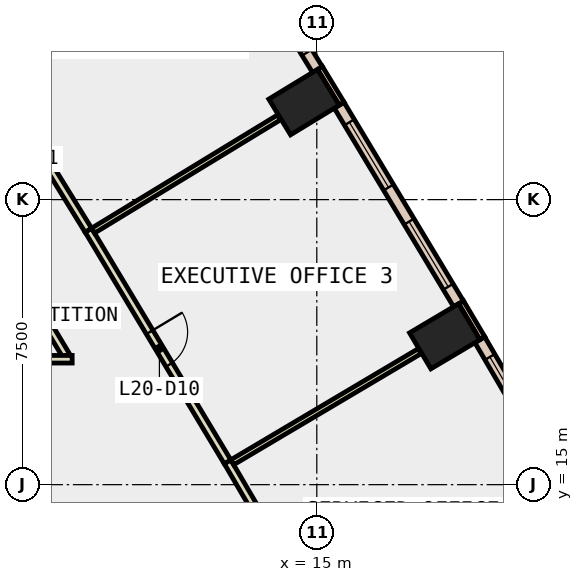
"""IFC4 building model, lengths in metres.
Left out: names, types, materials, properties, quantities, classifications, styles, units other than length and angle.
Written with IfcOpenShell. Run it as: python <this file> out.ifc"""

import sys

from ifc_helpers import new_model, si_unit, direction, frame, frame_2d, origin, origin_2d, place, context, subcontext, project, spatial, rectangle, extrude, element, fill, save


model = new_model("IFC4")
c1 = context("Model", 3, precision=1e-05, world=origin(), true_north=direction((0.0, 1.0)))
c2 = subcontext(c1, "Body", "Model", "MODEL_VIEW")
j1 = project(units=[si_unit("LENGTHUNIT", "METRE"), si_unit("PLANEANGLEUNIT", "RADIAN")], contexts=[c1])
p1 = place(None, origin())
s1 = spatial("IfcSite", under=j1, at=p1, CompositionType="ELEMENT")
p2 = place(p1, origin())
s2 = spatial("IfcBuilding", under=s1, at=p2, CompositionType="ELEMENT")
p3 = place(p2, frame((0.0, 0.0, 95.0)))
s3 = spatial("IfcBuildingStorey", under=s2, at=p3, CompositionType="ELEMENT", Elevation=95.0)
for number, where, z_axis, x_axis in (
    (1, (18.367, 18.904, -0.4), (0.0, 0.0, 1.0), (-0.51, 0.86, 0.0)),
    (2, (14.664, 25.065, -0.4), (0.0, 0.0, 1.0), (-0.52, 0.854, 0.0)),
):
    element("IfcColumn", number, at=place(p3, frame(where, z_axis=z_axis, x_axis=x_axis)), inside=s3, PredefinedType="COLUMN", context=c2, shape_type="SweptSolid", body=[
        extrude(rectangle(XDim=1.1, YDim=1.5, at=origin_2d()), origin(), (0.0, 0.0, 1.0), 4.2),
    ])
p4 = place(p3, frame((19.357, 18.852, 0.0), z_axis=(0.0, 0.0, 1.0), x_axis=(-0.510082245696, 0.860125631885, 0.0)))
e3 = element("IfcWall", 3, at=p4, inside=s3, PredefinedType="STANDARD", context=c2, shape_type="SweptSolid", body=[
    extrude(rectangle(XDim=1.1, YDim=0.15, at=frame_2d((0.55, 0.0))), origin(), (0.0, 0.0, 1.0), 3.8),
])
p5 = place(p3, frame((15.655, 25.024, 0.0), z_axis=(0.0, 0.0, 1.0), x_axis=(-0.51977099384, 0.854305632641, 0.0)))
e4 = element("IfcWall", 4, at=p5, inside=s3, PredefinedType="STANDARD", context=c2, shape_type="SweptSolid", body=[
    extrude(rectangle(XDim=1.101, YDim=0.15, at=frame_2d((0.55, 0.0))), origin(), (0.0, 0.0, 1.0), 3.8),
])
p6 = place(p3, frame((22.369, 13.549, 0.0), z_axis=(0.0, 0.0, 1.0), x_axis=(-0.504998117261, 0.863120444413, 0.0)))
e5 = element("IfcWall", 5, at=p6, inside=s3, PredefinedType="STANDARD", context=c2, shape_type="SweptSolid", body=[
    extrude(rectangle(XDim=6.099, YDim=0.3, at=frame_2d((3.049, 0.0))), origin(), (0.0, 0.0, 1.0), 3.8),
])
p7 = place(p6, frame((0.525, 0.0, 0.9)))
e6 = element("IfcOpeningElement", 6, at=p7, cuts=e5, PredefinedType="OPENING", context=c2, shape_type="SweptSolid", body=[
    extrude(rectangle(XDim=2.0, YDim=2.6, at=frame_2d((1.0, 1.3))), frame((0.0, 0.16, 0.0), z_axis=(0.0, -1.0, 0.0), x_axis=(1.0, 0.0, 0.0)), (0.0, 0.0, 1.0), 0.32),
])
p8 = place(p6, frame((3.574, 0.0, 0.9)))
e7 = element("IfcOpeningElement", 7, at=p8, cuts=e5, PredefinedType="OPENING", context=c2, shape_type="SweptSolid", body=[
    extrude(rectangle(XDim=2.0, YDim=2.6, at=frame_2d((1.0, 1.3))), frame((0.0, 0.16, 0.0), z_axis=(0.0, -1.0, 0.0), x_axis=(1.0, 0.0, 0.0)), (0.0, 0.0, 1.0), 0.32),
])
p9 = place(p3, frame((18.729, 19.757, 0.0), z_axis=(0.0, 0.0, 1.0), x_axis=(-0.515102053092, 0.857128855483, 0.0)))
e8 = element("IfcWall", 8, at=p9, inside=s3, PredefinedType="STANDARD", context=c2, shape_type="SweptSolid", body=[
    extrude(rectangle(XDim=6.098, YDim=0.3, at=frame_2d((3.049, 0.0))), origin(), (0.0, 0.0, 1.0), 3.8),
])
p10 = place(p9, frame((0.525, 0.0, 0.9)))
e9 = element("IfcOpeningElement", 9, at=p10, cuts=e8, PredefinedType="OPENING", context=c2, shape_type="SweptSolid", body=[
    extrude(rectangle(XDim=2.0, YDim=2.6, at=frame_2d((1.0, 1.3))), frame((0.0, 0.16, 0.0), z_axis=(0.0, -1.0, 0.0), x_axis=(1.0, 0.0, 0.0)), (0.0, 0.0, 1.0), 0.32),
])
p11 = place(p9, frame((3.574, 0.0, 0.9)))
e10 = element("IfcOpeningElement", 10, at=p11, cuts=e8, PredefinedType="OPENING", context=c2, shape_type="SweptSolid", body=[
    extrude(rectangle(XDim=2.0, YDim=2.6, at=frame_2d((1.0, 1.3))), frame((0.0, 0.16, 0.0), z_axis=(0.0, -1.0, 0.0), x_axis=(1.0, 0.0, 0.0)), (0.0, 0.0, 1.0), 0.32),
])
p12 = place(p3, frame((15.017, 25.922, 0.0), z_axis=(0.0, 0.0, 1.0), x_axis=(-0.525204788886, 0.850975869065, 0.0)))
e11 = element("IfcWall", 11, at=p12, inside=s3, PredefinedType="STANDARD", context=c2, shape_type="SweptSolid", body=[
    extrude(rectangle(XDim=6.099, YDim=0.3, at=frame_2d((3.049, 0.0))), origin(), (0.0, 0.0, 1.0), 3.8),
])
p13 = place(p12, frame((0.525, 0.0, 0.9)))
e12 = element("IfcOpeningElement", 12, at=p13, cuts=e11, PredefinedType="OPENING", context=c2, shape_type="SweptSolid", body=[
    extrude(rectangle(XDim=2.0, YDim=2.6, at=frame_2d((1.0, 1.3))), frame((0.0, 0.16, 0.0), z_axis=(0.0, -1.0, 0.0), x_axis=(1.0, 0.0, 0.0)), (0.0, 0.0, 1.0), 0.32),
])
p14 = place(p12, frame((3.574, 0.0, 0.9)))
e13 = element("IfcOpeningElement", 13, at=p14, cuts=e11, PredefinedType="OPENING", context=c2, shape_type="SweptSolid", body=[
    extrude(rectangle(XDim=2.0, YDim=2.6, at=frame_2d((1.0, 1.3))), frame((0.0, 0.16, 0.0), z_axis=(0.0, -1.0, 0.0), x_axis=(1.0, 0.0, 0.0)), (0.0, 0.0, 1.0), 0.32),
])
p15 = place(p3, frame((8.411, 18.386, 0.0), z_axis=(0.0, 0.0, 1.0), x_axis=(-0.515008089027, 0.857185317325, 0.0)))
e14 = element("IfcWall", 14, at=p15, inside=s3, PredefinedType="PARTITIONING", context=c2, shape_type="SweptSolid", body=[
    extrude(rectangle(XDim=2.452, YDim=0.2, at=frame_2d((1.226, 0.0))), origin(), (0.0, 0.0, 1.0), 3.8),
])
p16 = place(p3, frame((12.652, 15.602, 0.0), z_axis=(0.0, 0.0, 1.0), x_axis=(0.504914693075, -0.863169249172, 0.0)))
e15 = element("IfcWall", 15, at=p16, inside=s3, PredefinedType="PARTITIONING", context=c2, shape_type="SweptSolid", body=[
    extrude(rectangle(XDim=7.11, YDim=0.2, at=frame_2d((3.555, 0.0))), origin(), (0.0, 0.0, 1.0), 3.8),
])
p17 = place(p16, frame((3.13, 0.0, 0.0)))
e16 = element("IfcOpeningElement", 16, at=p17, cuts=e15, PredefinedType="OPENING", context=c2, shape_type="SweptSolid", body=[
    extrude(rectangle(XDim=1.0, YDim=2.1, at=frame_2d((0.5, 1.05))), frame((0.0, 0.11, 0.0), z_axis=(0.0, -1.0, 0.0), x_axis=(1.0, 0.0, 0.0)), (0.0, 0.0, 1.0), 0.22),
])
p18 = place(p3, frame((8.989, 21.696, 0.0), z_axis=(0.0, 0.0, 1.0), x_axis=(0.515000602442, -0.857189815318, 0.0)))
e17 = element("IfcWall", 17, at=p18, inside=s3, PredefinedType="PARTITIONING", context=c2, shape_type="SweptSolid", body=[
    extrude(rectangle(XDim=7.11, YDim=0.2, at=frame_2d((3.555, 0.0))), origin(), (0.0, 0.0, 1.0), 3.8),
])
p19 = place(p18, frame((3.13, 0.0, 0.0)))
e18 = element("IfcOpeningElement", 18, at=p19, cuts=e17, PredefinedType="OPENING", context=c2, shape_type="SweptSolid", body=[
    extrude(rectangle(XDim=1.0, YDim=2.1, at=frame_2d((0.5, 1.05))), frame((0.0, 0.11, 0.0), z_axis=(0.0, -1.0, 0.0), x_axis=(1.0, 0.0, 0.0)), (0.0, 0.0, 1.0), 0.22),
])
p20 = place(p3, frame((5.254, 27.747, 0.0), z_axis=(0.0, 0.0, 1.0), x_axis=(0.52516023635, -0.851003364363, 0.0)))
e19 = element("IfcWall", 19, at=p20, inside=s3, PredefinedType="PARTITIONING", context=c2, shape_type="SweptSolid", body=[
    extrude(rectangle(XDim=7.11, YDim=0.2, at=frame_2d((3.555, 0.0))), origin(), (0.0, 0.0, 1.0), 3.8),
])
p21 = place(p20, frame((3.13, 0.0, 0.0)))
e20 = element("IfcOpeningElement", 20, at=p21, cuts=e19, PredefinedType="OPENING", context=c2, shape_type="SweptSolid", body=[
    extrude(rectangle(XDim=1.0, YDim=2.1, at=frame_2d((0.5, 1.05))), frame((0.0, 0.11, 0.0), z_axis=(0.0, -1.0, 0.0), x_axis=(1.0, 0.0, 0.0)), (0.0, 0.0, 1.0), 0.22),
])
p22 = place(p3, frame((0.4, 18.3, 0.0), z_axis=(0.0, 0.0, 1.0), x_axis=(1.0, 0.0, 0.0)))
e21 = element("IfcWall", 21, at=p22, inside=s3, PredefinedType="PARTITIONING", context=c2, shape_type="SweptSolid", body=[
    extrude(rectangle(XDim=8.163, YDim=0.2, at=frame_2d((4.082, 0.0))), origin(), (0.0, 0.0, 1.0), 3.8),
])
p23 = place(p22, frame((3.356, 0.0, 0.0)))
e22 = element("IfcOpeningElement", 22, at=p23, cuts=e21, PredefinedType="OPENING", context=c2, shape_type="SweptSolid", body=[
    extrude(rectangle(XDim=1.0, YDim=2.1, at=frame_2d((0.5, 1.05))), frame((0.0, 0.11, 0.0), z_axis=(0.0, -1.0, 0.0), x_axis=(1.0, 0.0, 0.0)), (0.0, 0.0, 1.0), 0.22),
])
p24 = place(p22, frame((4.456, 0.0, 0.0)))
e23 = element("IfcOpeningElement", 23, at=p24, cuts=e21, PredefinedType="OPENING", context=c2, shape_type="SweptSolid", body=[
    extrude(rectangle(XDim=1.0, YDim=2.1, at=frame_2d((0.5, 1.05))), frame((0.0, 0.11, 0.0), z_axis=(0.0, -1.0, 0.0), x_axis=(1.0, 0.0, 0.0)), (0.0, 0.0, 1.0), 0.22),
])
p25 = place(p3, frame((12.776, 15.589, 0.0), z_axis=(0.0, 0.0, 1.0), x_axis=(0.860225086153, 0.509914503768, 0.0)))
e24 = element("IfcWall", 24, at=p25, inside=s3, PredefinedType="PARTITIONING", context=c2, shape_type="SweptSolid", body=[
    extrude(rectangle(XDim=5.73, YDim=0.15, at=frame_2d((2.865, 0.0))), origin(), (0.0, 0.0, 1.0), 3.8),
])
p26 = place(p3, frame((9.113, 21.684, 0.0), z_axis=(0.0, 0.0, 1.0), x_axis=(0.854075097122, 0.520149717367, 0.0)))
e25 = element("IfcWall", 25, at=p26, inside=s3, PredefinedType="PARTITIONING", context=c2, shape_type="SweptSolid", body=[
    extrude(rectangle(XDim=5.729, YDim=0.15, at=frame_2d((2.865, 0.0))), origin(), (0.0, 0.0, 1.0), 3.8),
])
p27 = place(p8, origin())
e26 = element("IfcWindow", 26, at=p27, inside=s3, PartitioningType="SINGLE_PANEL", PredefinedType="WINDOW", context=c2, shape_type="SweptSolid", body=[
    extrude(rectangle(XDim=2.0, YDim=2.6, at=frame_2d((1.0, 1.3))), frame((0.0, 0.03, 0.0), z_axis=(0.0, -1.0, 0.0), x_axis=(1.0, 0.0, 0.0)), (0.0, 0.0, 1.0), 0.06),
])
fill(e7, e26)
p28 = place(p10, origin())
e27 = element("IfcWindow", 27, at=p28, inside=s3, PartitioningType="SINGLE_PANEL", PredefinedType="WINDOW", context=c2, shape_type="SweptSolid", body=[
    extrude(rectangle(XDim=2.0, YDim=2.6, at=frame_2d((1.0, 1.3))), frame((0.0, 0.03, 0.0), z_axis=(0.0, -1.0, 0.0), x_axis=(1.0, 0.0, 0.0)), (0.0, 0.0, 1.0), 0.06),
])
fill(e9, e27)
p29 = place(p11, origin())
e28 = element("IfcWindow", 28, at=p29, inside=s3, PartitioningType="SINGLE_PANEL", PredefinedType="WINDOW", context=c2, shape_type="SweptSolid", body=[
    extrude(rectangle(XDim=2.0, YDim=2.6, at=frame_2d((1.0, 1.3))), frame((0.0, 0.03, 0.0), z_axis=(0.0, -1.0, 0.0), x_axis=(1.0, 0.0, 0.0)), (0.0, 0.0, 1.0), 0.06),
])
fill(e10, e28)
p30 = place(p13, origin())
e29 = element("IfcWindow", 29, at=p30, inside=s3, PartitioningType="SINGLE_PANEL", PredefinedType="WINDOW", context=c2, shape_type="SweptSolid", body=[
    extrude(rectangle(XDim=2.0, YDim=2.6, at=frame_2d((1.0, 1.3))), frame((0.0, 0.03, 0.0), z_axis=(0.0, -1.0, 0.0), x_axis=(1.0, 0.0, 0.0)), (0.0, 0.0, 1.0), 0.06),
])
fill(e12, e29)
p31 = place(p19, origin())
e30 = element("IfcDoor", 30, at=p31, inside=s3, OperationType="SINGLE_SWING_LEFT", PredefinedType="DOOR", context=c2, shape_type="SweptSolid", body=[
    extrude(rectangle(XDim=1.0, YDim=2.1, at=frame_2d((0.5, 1.05))), frame((0.0, 0.025, 0.0), z_axis=(0.0, -1.0, 0.0), x_axis=(1.0, 0.0, 0.0)), (0.0, 0.0, 1.0), 0.05),
])
fill(e18, e30)
save(model, sys.argv[1])
